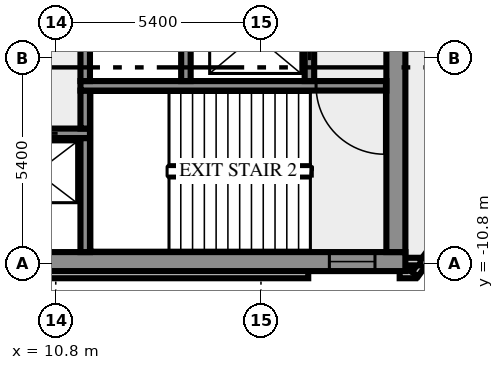
"""IFC4 building model, lengths in metres.
Left out: names, types, materials, properties, quantities, classifications, styles, units other than length and angle.
Written with IfcOpenShell. Run it as: python <this file> out.ifc"""

import sys

from ifc_helpers import new_model, si_unit, direction, frame, frame_2d, origin, place, context, subcontext, project, spatial, rectangle, extrude, element, fill, save


model = new_model("IFC4")
c1 = context("Model", 3, precision=1e-05, world=origin(), true_north=direction((0.0, 1.0)))
c2 = subcontext(c1, "Body", "Model", "MODEL_VIEW")
j1 = project(units=[si_unit("LENGTHUNIT", "METRE"), si_unit("PLANEANGLEUNIT", "RADIAN")], contexts=[c1])
p1 = place(None, origin())
s1 = spatial("IfcSite", under=j1, at=p1, CompositionType="ELEMENT")
p2 = place(p1, origin())
s2 = spatial("IfcBuilding", under=s1, at=p2, CompositionType="ELEMENT")
p3 = place(p2, frame((0.0, 0.0, 152.0)))
s3 = spatial("IfcBuildingStorey", under=s2, at=p3, CompositionType="ELEMENT", Elevation=152.0)
p4 = place(p3, frame((-17.444, -11.088, 0.0), z_axis=(0.0, 0.0, 1.0), x_axis=(1.0, 0.0, 0.0)))
e1 = element("IfcWall", 1, at=p4, inside=s3, PredefinedType="SOLIDWALL", context=c2, shape_type="SweptSolid", body=[
    extrude(rectangle(XDim=34.888, YDim=0.2, at=frame_2d((17.444, 0.0))), origin(), (0.0, 0.0, 1.0), 3.65),
])
p5 = place(p3, frame((19.85, -11.088, 0.0), z_axis=(0.0, 0.0, 1.0), x_axis=(1.0, 0.0, 0.0)))
e2 = element("IfcWall", 2, at=p5, inside=s3, PredefinedType="SOLIDWALL", context=c2, shape_type="SweptSolid", body=[
    extrude(rectangle(XDim=0.406, YDim=0.2, at=frame_2d((0.203, 0.0))), origin(), (0.0, 0.0, 1.0), 3.65),
])
p6 = place(p3, frame((20.253, -11.083, 0.0), z_axis=(0.0, 0.0, 1.0), x_axis=(0.587766567315, 0.809030569476, 0.0)))
e3 = element("IfcWall", 3, at=p6, inside=s3, PredefinedType="SOLIDWALL", context=c2, shape_type="SweptSolid", body=[
    extrude(rectangle(XDim=2.688, YDim=0.2, at=frame_2d((1.344, 0.0))), origin(), (0.0, 0.0, 1.0), 3.65),
])
p7 = place(p3, frame((19.98, -10.75, 0.0), z_axis=(0.0, 0.0, 1.0), x_axis=(1.0, 0.0, 0.0)))
e4 = element("IfcWall", 4, at=p7, inside=s3, PredefinedType="SOLIDWALL", context=c2, shape_type="SweptSolid", body=[
    extrude(rectangle(XDim=0.417, YDim=0.2, at=frame_2d((0.208, 0.0))), origin(), (0.0, 0.0, 1.0), 3.65),
])
p8 = place(p3, frame((-20.0, -10.75, 0.0), z_axis=(0.0, 0.0, 1.0), x_axis=(1.0, 0.0, 0.0)))
e5 = element("IfcWall", 5, at=p8, inside=s3, PredefinedType="SHEAR", context=c2, shape_type="SweptSolid", body=[
    extrude(rectangle(XDim=40.0, YDim=0.5, at=frame_2d((20.0, 0.0))), origin(), (0.0, 0.0, 1.0), 3.65),
])
p9 = place(p8, frame((0.8, 0.0, 1.0)))
e6 = element("IfcOpeningElement", 6, at=p9, cuts=e5, PredefinedType="OPENING", context=c2, shape_type="SweptSolid", body=[
    extrude(rectangle(XDim=1.2, YDim=1.2, at=frame_2d((0.6, 0.6))), frame((0.0, 0.26, 0.0), z_axis=(0.0, -1.0, 0.0), x_axis=(1.0, 0.0, 0.0)), (0.0, 0.0, 1.0), 0.52),
])
p10 = place(p8, frame((38.0, 0.0, 1.0)))
e7 = element("IfcOpeningElement", 7, at=p10, cuts=e5, PredefinedType="OPENING", context=c2, shape_type="SweptSolid", body=[
    extrude(rectangle(XDim=1.2, YDim=1.2, at=frame_2d((0.6, 0.6))), frame((0.0, 0.26, 0.0), z_axis=(0.0, -1.0, 0.0), x_axis=(1.0, 0.0, 0.0)), (0.0, 0.0, 1.0), 0.52),
])
p11 = place(p3, frame((11.575, -10.5, 0.0), z_axis=(0.0, 0.0, 1.0), x_axis=(0.0, 1.0, 0.0)))
e8 = element("IfcWall", 8, at=p11, inside=s3, PredefinedType="SHEAR", context=c2, shape_type="SweptSolid", body=[
    extrude(rectangle(XDim=3.0, YDim=0.25, at=frame_2d((1.5, 0.0))), origin(), (0.0, 0.0, 1.0), 3.65),
])
p12 = place(p3, frame((19.75, -10.5, 0.0), z_axis=(0.0, 0.0, 1.0), x_axis=(0.0, 1.0, 0.0)))
e9 = element("IfcWall", 9, at=p12, inside=s3, PredefinedType="SHEAR", context=c2, shape_type="SweptSolid", body=[
    extrude(rectangle(XDim=8.8, YDim=0.5, at=frame_2d((4.4, 0.0))), origin(), (0.0, 0.0, 1.0), 3.65),
])
p13 = place(p3, frame((11.7, -7.375, 0.0), z_axis=(0.0, 0.0, 1.0), x_axis=(-1.0, 0.0, 0.0)))
e10 = element("IfcWall", 10, at=p13, inside=s3, PredefinedType="SHEAR", context=c2, shape_type="SweptSolid", body=[
    extrude(rectangle(XDim=23.4, YDim=0.25, at=frame_2d((11.7, 0.0))), origin(), (0.0, 0.0, 1.0), 3.65),
])
p14 = place(p13, frame((21.812, 0.0, 0.0)))
e11 = element("IfcOpeningElement", 11, at=p14, cuts=e10, PredefinedType="OPENING", context=c2, shape_type="SweptSolid", body=[
    extrude(rectangle(XDim=0.9, YDim=2.1, at=frame_2d((0.45, 1.05))), frame((0.0, 0.135, 0.0), z_axis=(0.0, -1.0, 0.0), x_axis=(1.0, 0.0, 0.0)), (0.0, 0.0, 1.0), 0.27),
])
p15 = place(p13, frame((19.55, 0.0, 0.0)))
e12 = element("IfcOpeningElement", 12, at=p15, cuts=e10, PredefinedType="OPENING", context=c2, shape_type="SweptSolid", body=[
    extrude(rectangle(XDim=0.9, YDim=2.1, at=frame_2d((0.45, 1.05))), frame((0.0, 0.135, 0.0), z_axis=(0.0, -1.0, 0.0), x_axis=(1.0, 0.0, 0.0)), (0.0, 0.0, 1.0), 0.27),
])
p16 = place(p13, frame((16.787, 0.0, 0.0)))
e13 = element("IfcOpeningElement", 13, at=p16, cuts=e10, PredefinedType="OPENING", context=c2, shape_type="SweptSolid", body=[
    extrude(rectangle(XDim=0.9, YDim=2.1, at=frame_2d((0.45, 1.05))), frame((0.0, 0.135, 0.0), z_axis=(0.0, -1.0, 0.0), x_axis=(1.0, 0.0, 0.0)), (0.0, 0.0, 1.0), 0.27),
])
p17 = place(p13, frame((14.55, 0.0, 0.0)))
e14 = element("IfcOpeningElement", 14, at=p17, cuts=e10, PredefinedType="OPENING", context=c2, shape_type="SweptSolid", body=[
    extrude(rectangle(XDim=0.8, YDim=2.1, at=frame_2d((0.4, 1.05))), frame((0.0, 0.135, 0.0), z_axis=(0.0, -1.0, 0.0), x_axis=(1.0, 0.0, 0.0)), (0.0, 0.0, 1.0), 0.27),
])
p18 = place(p13, frame((12.8, 0.0, 0.0)))
e15 = element("IfcOpeningElement", 15, at=p18, cuts=e10, PredefinedType="OPENING", context=c2, shape_type="SweptSolid", body=[
    extrude(rectangle(XDim=0.9, YDim=2.1, at=frame_2d((0.45, 1.05))), frame((0.0, 0.135, 0.0), z_axis=(0.0, -1.0, 0.0), x_axis=(1.0, 0.0, 0.0)), (0.0, 0.0, 1.0), 0.27),
])
p19 = place(p13, frame((10.7, 0.0, 0.0)))
e16 = element("IfcOpeningElement", 16, at=p19, cuts=e10, PredefinedType="OPENING", context=c2, shape_type="SweptSolid", body=[
    extrude(rectangle(XDim=0.9, YDim=2.1, at=frame_2d((0.45, 1.05))), frame((0.0, 0.135, 0.0), z_axis=(0.0, -1.0, 0.0), x_axis=(1.0, 0.0, 0.0)), (0.0, 0.0, 1.0), 0.27),
])
p20 = place(p13, frame((8.35, 0.0, 0.0)))
e17 = element("IfcOpeningElement", 17, at=p20, cuts=e10, PredefinedType="OPENING", context=c2, shape_type="SweptSolid", body=[
    extrude(rectangle(XDim=1.1, YDim=2.1, at=frame_2d((0.55, 1.05))), frame((0.0, 0.135, 0.0), z_axis=(0.0, -1.0, 0.0), x_axis=(1.0, 0.0, 0.0)), (0.0, 0.0, 1.0), 0.27),
])
p21 = place(p13, frame((5.85, 0.0, 0.0)))
e18 = element("IfcOpeningElement", 18, at=p21, cuts=e10, PredefinedType="OPENING", context=c2, shape_type="SweptSolid", body=[
    extrude(rectangle(XDim=1.1, YDim=2.1, at=frame_2d((0.55, 1.05))), frame((0.0, 0.135, 0.0), z_axis=(0.0, -1.0, 0.0), x_axis=(1.0, 0.0, 0.0)), (0.0, 0.0, 1.0), 0.27),
])
p22 = place(p13, frame((3.35, 0.0, 0.0)))
e19 = element("IfcOpeningElement", 19, at=p22, cuts=e10, PredefinedType="OPENING", context=c2, shape_type="SweptSolid", body=[
    extrude(rectangle(XDim=1.1, YDim=2.1, at=frame_2d((0.55, 1.05))), frame((0.0, 0.135, 0.0), z_axis=(0.0, -1.0, 0.0), x_axis=(1.0, 0.0, 0.0)), (0.0, 0.0, 1.0), 0.27),
])
p23 = place(p13, frame((0.85, 0.0, 0.0)))
e20 = element("IfcOpeningElement", 20, at=p23, cuts=e10, PredefinedType="OPENING", context=c2, shape_type="SweptSolid", body=[
    extrude(rectangle(XDim=1.1, YDim=2.1, at=frame_2d((0.55, 1.05))), frame((0.0, 0.135, 0.0), z_axis=(0.0, -1.0, 0.0), x_axis=(1.0, 0.0, 0.0)), (0.0, 0.0, 1.0), 0.27),
])
p24 = place(p3, frame((11.575, -7.25, 0.0), z_axis=(0.0, 0.0, 1.0), x_axis=(0.0, 1.0, 0.0)))
e21 = element("IfcWall", 21, at=p24, inside=s3, PredefinedType="SHEAR", context=c2, shape_type="SweptSolid", body=[
    extrude(rectangle(XDim=1.0, YDim=0.25, at=frame_2d((0.5, 0.0))), origin(), (0.0, 0.0, 1.0), 3.65),
])
p25 = place(p3, frame((19.5, -6.125, 0.0), z_axis=(0.0, 0.0, 1.0), x_axis=(-1.0, 0.0, 0.0)))
e22 = element("IfcWall", 22, at=p25, inside=s3, PredefinedType="SHEAR", context=c2, shape_type="SweptSolid", body=[
    extrude(rectangle(XDim=8.05, YDim=0.25, at=frame_2d((4.025, 0.0))), origin(), (0.0, 0.0, 1.0), 3.65),
])
p26 = place(p25, frame((0.05, 0.0, 0.0)))
e23 = element("IfcOpeningElement", 23, at=p26, cuts=e22, PredefinedType="OPENING", context=c2, shape_type="SweptSolid", body=[
    extrude(rectangle(XDim=1.8, YDim=2.1, at=frame_2d((0.9, 1.05))), frame((0.0, 0.135, 0.0), z_axis=(0.0, -1.0, 0.0), x_axis=(1.0, 0.0, 0.0)), (0.0, 0.0, 1.0), 0.27),
])
p27 = place(p3, frame((11.575, -6.0, 0.0), z_axis=(0.0, 0.0, 1.0), x_axis=(0.0, 1.0, 0.0)))
e24 = element("IfcWall", 24, at=p27, inside=s3, PredefinedType="SHEAR", context=c2, shape_type="SweptSolid", body=[
    extrude(rectangle(XDim=1.75, YDim=0.25, at=frame_2d((0.875, 0.0))), origin(), (0.0, 0.0, 1.0), 3.65),
])
p28 = place(p3, frame((14.225, -6.0, 0.0), z_axis=(0.0, 0.0, 1.0), x_axis=(0.0, 1.0, 0.0)))
e25 = element("IfcWall", 25, at=p28, inside=s3, PredefinedType="SHEAR", context=c2, shape_type="SweptSolid", body=[
    extrude(rectangle(XDim=4.3, YDim=0.25, at=frame_2d((2.15, 0.0))), origin(), (0.0, 0.0, 1.0), 3.65),
])
p29 = place(p3, frame((17.475, -6.0, 0.0), z_axis=(0.0, 0.0, 1.0), x_axis=(0.0, 1.0, 0.0)))
e26 = element("IfcWall", 26, at=p29, inside=s3, PredefinedType="SHEAR", context=c2, shape_type="SweptSolid", body=[
    extrude(rectangle(XDim=4.3, YDim=0.25, at=frame_2d((2.15, 0.0))), origin(), (0.0, 0.0, 1.0), 3.65),
])
p30 = place(p29, frame((0.55, 0.0, 0.0)))
e27 = element("IfcOpeningElement", 27, at=p30, cuts=e26, PredefinedType="OPENING", context=c2, shape_type="SweptSolid", body=[
    extrude(rectangle(XDim=1.3, YDim=2.1, at=frame_2d((0.65, 1.05))), frame((0.0, 0.135, 0.0), z_axis=(0.0, -1.0, 0.0), x_axis=(1.0, 0.0, 0.0)), (0.0, 0.0, 1.0), 0.27),
])
p31 = place(p10, origin())
e28 = element("IfcWindow", 28, at=p31, inside=s3, PartitioningType="SINGLE_PANEL", PredefinedType="WINDOW", context=c2, shape_type="SweptSolid", body=[
    extrude(rectangle(XDim=1.2, YDim=1.2, at=frame_2d((0.6, 0.6))), frame((0.0, 0.03, 0.0), z_axis=(0.0, -1.0, 0.0), x_axis=(1.0, 0.0, 0.0)), (0.0, 0.0, 1.0), 0.06),
])
fill(e7, e28)
p32 = place(p23, origin())
e29 = element("IfcDoor", 29, at=p32, inside=s3, OperationType="DOUBLE_DOOR_SLIDING", PredefinedType="DOOR", context=c2, shape_type="SweptSolid", body=[
    extrude(rectangle(XDim=1.1, YDim=2.1, at=frame_2d((0.55, 1.05))), frame((0.0, 0.025, 0.0), z_axis=(0.0, -1.0, 0.0), x_axis=(1.0, 0.0, 0.0)), (0.0, 0.0, 1.0), 0.05),
])
fill(e20, e29)
p33 = place(p26, origin())
e30 = element("IfcDoor", 30, at=p33, inside=s3, OperationType="DOUBLE_DOOR_SINGLE_SWING", PredefinedType="DOOR", context=c2, shape_type="SweptSolid", body=[
    extrude(rectangle(XDim=1.8, YDim=2.1, at=frame_2d((0.9, 1.05))), frame((0.0, 0.025, 0.0), z_axis=(0.0, -1.0, 0.0), x_axis=(1.0, 0.0, 0.0)), (0.0, 0.0, 1.0), 0.05),
])
fill(e23, e30)
p34 = place(p30, origin())
e31 = element("IfcDoor", 31, at=p34, inside=s3, OperationType="DOUBLE_DOOR_SLIDING", PredefinedType="DOOR", context=c2, shape_type="SweptSolid", body=[
    extrude(rectangle(XDim=1.3, YDim=2.1, at=frame_2d((0.65, 1.05))), frame((0.0, 0.025, 0.0), z_axis=(0.0, -1.0, 0.0), x_axis=(1.0, 0.0, 0.0)), (0.0, 0.0, 1.0), 0.05),
])
fill(e27, e31)
save(model, sys.argv[1])
